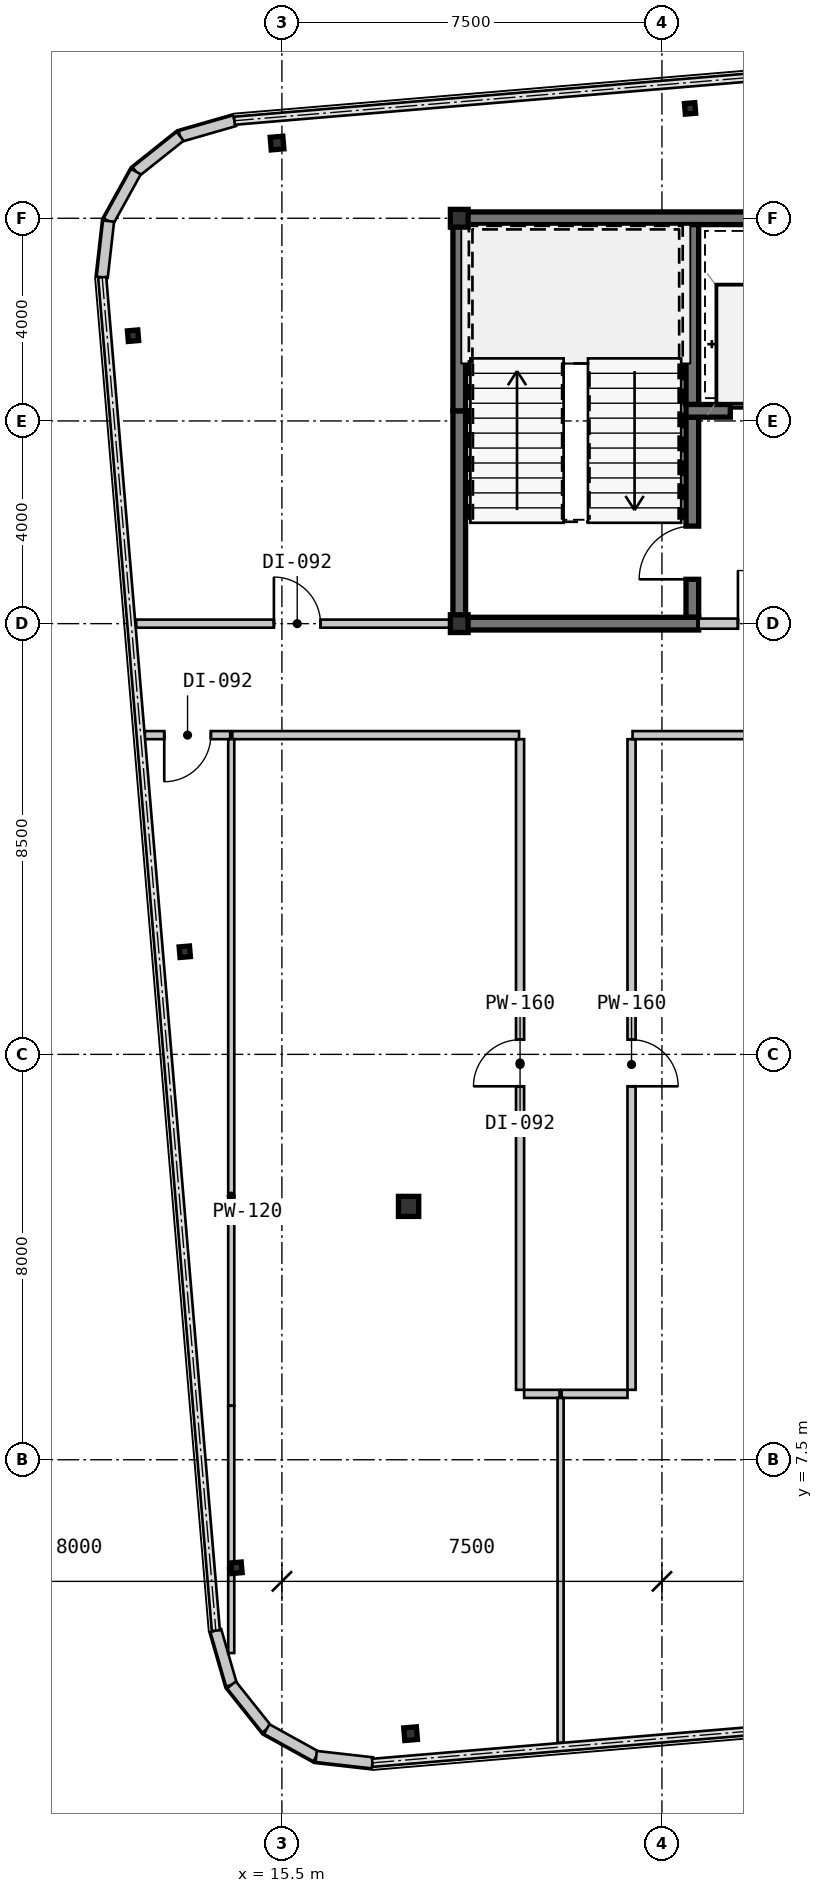
"""IFC4 building model, lengths in metres.
Left out: names, types, materials, properties, quantities, classifications, styles, units other than length and angle.
Written with IfcOpenShell. Run it as: python <this file> out.ifc"""

import sys

from ifc_helpers import new_model, si_unit, direction, frame, frame_2d, origin, origin_2d, place, context, subcontext, project, spatial, rectangle, hollow_rectangle, i_section, extrude, source, transform, mapped, element, fill, save


model = new_model("IFC4")
c1 = context("Model", 3, precision=1e-05, world=origin(), true_north=direction((0.0, 1.0)))
c2 = subcontext(c1, "Body", "Model", "MODEL_VIEW")
j1 = project(units=[si_unit("LENGTHUNIT", "METRE"), si_unit("PLANEANGLEUNIT", "RADIAN")], contexts=[c1])
p1 = place(None, origin())
s1 = spatial("IfcSite", under=j1, at=p1, CompositionType="ELEMENT")
p2 = place(p1, origin())
s2 = spatial("IfcBuilding", under=s1, at=p2, CompositionType="ELEMENT")
p3 = place(p2, frame((0.0, 0.0, 172.55)))
s3 = spatial("IfcBuildingStorey", under=s2, at=p3, CompositionType="ELEMENT", Elevation=172.55)
m1 = source(origin(), c2, "Body", "SweptSolid", [
    extrude(hollow_rectangle(XDim=0.35, YDim=0.35, WallThickness=0.016, at=origin_2d()), origin(), (0.0, 0.0, 1.0), 3.15),
])
for number, where, z_axis, x_axis in (
    (1, (19.0, 24.0, 0.0), (0.0, 0.0, 1.0), (1.0, 0.0, 0.0)),
    (2, (19.0, 32.0, 0.0), (0.0, 0.0, 1.0), (1.0, 0.0, 0.0)),
):
    element("IfcColumn", number, at=place(p3, frame(where, z_axis=z_axis, x_axis=x_axis)), inside=s3, PredefinedType="COLUMN", context=c2, shape_type="MappedRepresentation", body=[
        mapped(m1, transform((0.0, 0.0, 0.0), scale=1.0)),
    ])
m2 = source(origin(), c2, "Body", "SweptSolid", [
    extrude(i_section(OverallWidth=0.4, OverallDepth=0.396, WebThickness=0.022, FlangeThickness=0.034, at=origin_2d()), origin(), (0.0, 0.0, 1.0), 3.15),
])
p4 = place(p3, frame((18.0, 12.5, 0.0), z_axis=(0.0, 0.0, 1.0), x_axis=(1.0, 0.0, 0.0)))
e3 = element("IfcColumn", 3, at=p4, inside=s3, PredefinedType="COLUMN", context=c2, shape_type="MappedRepresentation", body=[
    mapped(m2, transform((0.0, 0.0, 0.0), scale=1.0)),
])
m3 = source(origin(), c2, "Body", "SweptSolid", [
    extrude(hollow_rectangle(XDim=0.25, YDim=0.25, WallThickness=0.01, at=origin_2d()), origin(), (0.0, 0.0, 1.0), 3.15),
])
for number, where, z_axis, x_axis in (
    (4, (18.04, 2.094, 0.0), (0.0, 0.0, 1.0), (0.996, 0.084, 0.0)),
    (5, (15.404, 33.484, 0.0), (0.0, 0.0, 1.0), (0.996, 0.084, 0.0)),
):
    element("IfcColumn", number, at=place(p3, frame(where, z_axis=z_axis, x_axis=x_axis)), inside=s3, PredefinedType="COLUMN", context=c2, shape_type="MappedRepresentation", body=[
        mapped(m3, transform((0.0, 0.0, 0.0), scale=1.0)),
    ])
m4 = source(origin(), c2, "Body", "SweptSolid", [
    extrude(i_section(OverallWidth=0.205, OverallDepth=0.21, WebThickness=0.009, FlangeThickness=0.014, at=origin_2d()), origin(), (0.0, 0.0, 1.0), 3.15),
])
for number, where, z_axis, x_axis in (
    (6, (23.555, 34.168, 0.0), (0.0, 0.0, 1.0), (0.996, 0.084, 0.0)),
    (7, (14.604, 5.368, 0.0), (0.0, 0.0, 1.0), (0.996, 0.084, 0.0)),
    (8, (13.583, 17.525, 0.0), (0.0, 0.0, 1.0), (0.996, 0.084, 0.0)),
    (9, (12.562, 29.682, 0.0), (0.0, 0.0, 1.0), (0.996, 0.084, 0.0)),
):
    element("IfcColumn", number, at=place(p3, frame(where, z_axis=z_axis, x_axis=x_axis)), inside=s3, PredefinedType="COLUMN", context=c2, shape_type="MappedRepresentation", body=[
        mapped(m4, transform((0.0, 0.0, 0.0), scale=1.0)),
    ])
m5 = source(origin(), c2, "Body", "SweptSolid", [
    extrude(rectangle(XDim=1.116, YDim=0.22, at=frame_2d((0.558, 0.0))), origin(), (0.0, 0.0, 1.0), 2.93),
])
p5 = place(p3, frame((14.564, 33.925, 0.0), z_axis=(0.0, 0.0, 1.0), x_axis=(-0.961010464297, -0.276512002475, 0.0)))
e10 = element("IfcWall", 10, at=p5, inside=s3, PredefinedType="SOLIDWALL", context=c2, shape_type="MappedRepresentation", body=[
    mapped(m5, transform((0.0, 0.0, 0.0), scale=1.0)),
])
m6 = source(origin(), c2, "Body", "SweptSolid", [
    extrude(rectangle(XDim=1.116, YDim=0.22, at=frame_2d((0.558, 0.0))), origin(), (0.0, 0.0, 1.0), 2.93),
])
p6 = place(p3, frame((13.491, 33.616, 0.0), z_axis=(0.0, 0.0, 1.0), x_axis=(-0.782062884215, -0.623199522732, 0.0)))
e11 = element("IfcWall", 11, at=p6, inside=s3, PredefinedType="SOLIDWALL", context=c2, shape_type="MappedRepresentation", body=[
    mapped(m6, transform((0.0, 0.0, 0.0), scale=1.0)),
])
for number, where, z_axis, x_axis in (
    (12, (12.619, 32.921, 0.0), (0.0, 0.0, 1.0), (-0.484, -0.875, 0.0)),
    (13, (12.079, 31.944, 0.0), (0.0, 0.0, 1.0), (-0.112, -0.994, 0.0)),
    (14, (14.196, 4.13, 0.0), (0.0, 0.0, 1.0), (0.277, -0.961, 0.0)),
    (15, (14.504, 3.057, 0.0), (0.0, 0.0, 1.0), (0.623, -0.782, 0.0)),
    (16, (15.2, 2.184, 0.0), (0.0, 0.0, 1.0), (0.875, -0.484, 0.0)),
    (17, (16.176, 1.644, 0.0), (0.0, 0.0, 1.0), (0.994, -0.112, 0.0)),
):
    element("IfcWall", number, at=place(p3, frame(where, z_axis=z_axis, x_axis=x_axis)), inside=s3, PredefinedType="SOLIDWALL", context=c2, shape_type="MappedRepresentation", body=[
        mapped(m5, transform((0.0, 0.0, 0.0), scale=1.0)),
    ])
m7 = source(origin(), c2, "Body", "SweptSolid", [
    extrude(rectangle(XDim=9.125, YDim=0.25, at=frame_2d((4.562, 0.0))), origin(), (0.0, 0.0, 1.0), 2.93),
])
p7 = place(p3, frame((18.875, 32.0, 0.0), z_axis=(0.0, 0.0, 1.0), x_axis=(1.0, 0.0, 0.0)))
e18 = element("IfcWall", 18, at=p7, inside=s3, PredefinedType="SHEAR", context=c2, shape_type="MappedRepresentation", body=[
    mapped(m7, transform((0.0, 0.0, 0.0), scale=1.0)),
])
m8 = source(origin(), c2, "Body", "SweptSolid", [
    extrude(rectangle(XDim=4.075, YDim=0.25, at=frame_2d((2.038, 0.0))), origin(), (0.0, 0.0, 1.0), 2.93),
])
p8 = place(p3, frame((19.0, 24.125, 0.0), z_axis=(0.0, 0.0, 1.0), x_axis=(0.0, 1.0, 0.0)))
e19 = element("IfcWall", 19, at=p8, inside=s3, PredefinedType="SHEAR", context=c2, shape_type="MappedRepresentation", body=[
    mapped(m8, transform((0.0, 0.0, 0.0), scale=1.0)),
])
m9 = source(origin(), c2, "Body", "SweptSolid", [
    extrude(rectangle(XDim=3.675, YDim=0.25, at=frame_2d((1.837, 0.0))), origin(), (0.0, 0.0, 1.0), 2.93),
])
p9 = place(p3, frame((19.0, 28.2, 0.0), z_axis=(0.0, 0.0, 1.0), x_axis=(0.0, 1.0, 0.0)))
e20 = element("IfcWall", 20, at=p9, inside=s3, PredefinedType="SHEAR", context=c2, shape_type="MappedRepresentation", body=[
    mapped(m9, transform((0.0, 0.0, 0.0), scale=1.0)),
])
m10 = source(origin(), c2, "Body", "SweptSolid", [
    extrude(rectangle(XDim=3.55, YDim=0.25, at=frame_2d((1.775, 0.0))), origin(), (0.0, 0.0, 1.0), 2.93),
])
p10 = place(p3, frame((23.6, 28.325, 0.0), z_axis=(0.0, 0.0, 1.0), x_axis=(0.0, 1.0, 0.0)))
e21 = element("IfcWall", 21, at=p10, inside=s3, PredefinedType="SHEAR", context=c2, shape_type="MappedRepresentation", body=[
    mapped(m10, transform((0.0, 0.0, 0.0), scale=1.0)),
])
m11 = source(origin(), c2, "Body", "SweptSolid", [
    extrude(rectangle(XDim=3.95, YDim=0.25, at=frame_2d((1.975, 0.0))), origin(), (0.0, 0.0, 1.0), 2.93),
])
p11 = place(p3, frame((23.6, 24.125, 0.0), z_axis=(0.0, 0.0, 1.0), x_axis=(0.0, 1.0, 0.0)))
e22 = element("IfcWall", 22, at=p11, inside=s3, PredefinedType="SHEAR", context=c2, shape_type="MappedRepresentation", body=[
    mapped(m11, transform((0.0, 0.0, 0.0), scale=1.0)),
])
m12 = source(origin(), c2, "Body", "SweptSolid", [
    extrude(rectangle(XDim=1.05, YDim=2.1, at=frame_2d((0.525, 1.05))), frame((0.0, 0.135, 0.0), z_axis=(0.0, -1.0, 0.0), x_axis=(1.0, 0.0, 0.0)), (0.0, 0.0, 1.0), 0.27),
])
p12 = place(p11, frame((0.75, 0.0, 0.0)))
e23 = element("IfcOpeningElement", 23, at=p12, cuts=e22, PredefinedType="OPENING", context=c2, shape_type="MappedRepresentation", body=[
    mapped(m12, transform((0.0, 0.0, 0.0), scale=1.0)),
])
m13 = source(origin(), c2, "Body", "SweptSolid", [
    extrude(rectangle(XDim=4.85, YDim=0.25, at=frame_2d((2.425, 0.0))), origin(), (0.0, 0.0, 1.0), 2.93),
])
p13 = place(p3, frame((18.875, 24.0, 0.0), z_axis=(0.0, 0.0, 1.0), x_axis=(1.0, 0.0, 0.0)))
e24 = element("IfcWall", 24, at=p13, inside=s3, PredefinedType="SHEAR", context=c2, shape_type="MappedRepresentation", body=[
    mapped(m13, transform((0.0, 0.0, 0.0), scale=1.0)),
])
m14 = source(origin(), c2, "Body", "SweptSolid", [
    extrude(rectangle(XDim=2.85, YDim=0.25, at=frame_2d((1.425, 0.0))), origin(), (0.0, 0.0, 1.0), 2.93),
])
p14 = place(p3, frame((23.475, 28.2, 0.0), z_axis=(0.0, 0.0, 1.0), x_axis=(1.0, 0.0, 0.0)))
e25 = element("IfcWall", 25, at=p14, inside=s3, PredefinedType="SHEAR", context=c2, shape_type="MappedRepresentation", body=[
    mapped(m14, transform((0.0, 0.0, 0.0), scale=1.0)),
])
m15 = source(origin(), c2, "Body", "SweptSolid", [
    extrude(rectangle(XDim=1.1, YDim=2.15, at=frame_2d((0.55, 1.075))), frame((0.0, 0.135, 0.0), z_axis=(0.0, -1.0, 0.0), x_axis=(1.0, 0.0, 0.0)), (0.0, 0.0, 1.0), 0.27),
])
p15 = place(p14, frame((0.875, 0.0, 0.0)))
e26 = element("IfcOpeningElement", 26, at=p15, cuts=e25, PredefinedType="OPENING", context=c2, shape_type="MappedRepresentation", body=[
    mapped(m15, transform((0.0, 0.0, 0.0), scale=1.0)),
])
m16 = source(origin(), c2, "Body", "SweptSolid", [
    extrude(rectangle(XDim=2.725, YDim=0.2, at=frame_2d((1.362, 0.0))), origin(), (0.0, 0.0, 1.0), 2.47),
])
p16 = place(p3, frame((23.725, 24.0, 0.0), z_axis=(0.0, 0.0, 1.0), x_axis=(1.0, 0.0, 0.0)))
e27 = element("IfcWall", 27, at=p16, inside=s3, PredefinedType="SOLIDWALL", context=c2, shape_type="MappedRepresentation", body=[
    mapped(m16, transform((0.0, 0.0, 0.0), scale=1.0)),
])
m17 = source(origin(), c2, "Body", "SweptSolid", [
    extrude(rectangle(XDim=1.05, YDim=2.1, at=frame_2d((0.525, 1.05))), frame((0.0, 0.11, 0.0), z_axis=(0.0, -1.0, 0.0), x_axis=(1.0, 0.0, 0.0)), (0.0, 0.0, 1.0), 0.22),
])
p17 = place(p16, frame((0.775, 0.0, 0.0)))
e28 = element("IfcOpeningElement", 28, at=p17, cuts=e27, PredefinedType="OPENING", context=c2, shape_type="MappedRepresentation", body=[
    mapped(m17, transform((0.0, 0.0, 0.0), scale=1.0)),
])
m18 = source(origin(), c2, "Body", "SweptSolid", [
    extrude(rectangle(XDim=6.251, YDim=0.16, at=frame_2d((3.125, 0.0))), origin(), (0.0, 0.0, 1.0), 2.93),
])
p18 = place(p3, frame((12.624, 24.0, 0.0), z_axis=(0.0, 0.0, 1.0), x_axis=(1.0, 0.0, 0.0)))
e29 = element("IfcWall", 29, at=p18, inside=s3, PredefinedType="PARTITIONING", context=c2, shape_type="MappedRepresentation", body=[
    mapped(m18, transform((0.0, 0.0, 0.0), scale=1.0)),
])
m19 = source(origin(), c2, "Body", "SweptSolid", [
    extrude(rectangle(XDim=0.92, YDim=2.1, at=frame_2d((0.46, 1.05))), frame((0.0, 0.09, 0.0), z_axis=(0.0, -1.0, 0.0), x_axis=(1.0, 0.0, 0.0)), (0.0, 0.0, 1.0), 0.18),
])
p19 = place(p18, frame((2.718, 0.0, 0.0)))
e30 = element("IfcOpeningElement", 30, at=p19, cuts=e29, PredefinedType="OPENING", context=c2, shape_type="MappedRepresentation", body=[
    mapped(m19, transform((0.0, 0.0, 0.0), scale=1.0)),
])
m20 = source(origin(), c2, "Body", "SweptSolid", [
    extrude(rectangle(XDim=1.684, YDim=0.16, at=frame_2d((0.842, 0.0))), origin(), (0.0, 0.0, 1.0), 2.93),
])
p20 = place(p3, frame((14.48, 21.8, 0.0), z_axis=(0.0, 0.0, 1.0), x_axis=(-1.0, 0.0, 0.0)))
e31 = element("IfcWall", 31, at=p20, inside=s3, PredefinedType="PARTITIONING", context=c2, shape_type="MappedRepresentation", body=[
    mapped(m20, transform((0.0, 0.0, 0.0), scale=1.0)),
])
p21 = place(p20, frame((0.382, 0.0, 0.0)))
e32 = element("IfcOpeningElement", 32, at=p21, cuts=e31, PredefinedType="OPENING", context=c2, shape_type="MappedRepresentation", body=[
    mapped(m19, transform((0.0, 0.0, 0.0), scale=1.0)),
])
m21 = source(origin(), c2, "Body", "SweptSolid", [
    extrude(rectangle(XDim=12.84, YDim=0.16, at=frame_2d((6.42, 0.0))), origin(), (0.0, 0.0, 1.0), 2.93),
])
p22 = place(p3, frame((20.2, 8.88, 0.0), z_axis=(0.0, 0.0, 1.0), x_axis=(0.0, 1.0, 0.0)))
e33 = element("IfcWall", 33, at=p22, inside=s3, PredefinedType="PARTITIONING", context=c2, shape_type="MappedRepresentation", body=[
    mapped(m21, transform((0.0, 0.0, 0.0), scale=1.0)),
])
p23 = place(p22, frame((5.99, 0.0, 0.0)))
e34 = element("IfcOpeningElement", 34, at=p23, cuts=e33, PredefinedType="OPENING", context=c2, shape_type="MappedRepresentation", body=[
    mapped(m19, transform((0.0, 0.0, 0.0), scale=1.0)),
])
m22 = source(origin(), c2, "Body", "SweptSolid", [
    extrude(rectangle(XDim=5.659, YDim=0.16, at=frame_2d((2.83, 0.0))), origin(), (0.0, 0.0, 1.0), 2.93),
])
p24 = place(p3, frame((20.18, 21.8, 0.0), z_axis=(0.0, 0.0, 1.0), x_axis=(-1.0, 0.0, 0.0)))
e35 = element("IfcWall", 35, at=p24, inside=s3, PredefinedType="PARTITIONING", context=c2, shape_type="MappedRepresentation", body=[
    mapped(m22, transform((0.0, 0.0, 0.0), scale=1.0)),
])
m23 = source(origin(), c2, "Body", "SweptSolid", [
    extrude(rectangle(XDim=0.7, YDim=0.16, at=frame_2d((0.35, 0.0))), origin(), (0.0, 0.0, 1.0), 2.93),
])
p25 = place(p3, frame((20.98, 8.8, 0.0), z_axis=(0.0, 0.0, 1.0), x_axis=(-1.0, 0.0, 0.0)))
e36 = element("IfcWall", 36, at=p25, inside=s3, PredefinedType="PARTITIONING", context=c2, shape_type="MappedRepresentation", body=[
    mapped(m23, transform((0.0, 0.0, 0.0), scale=1.0)),
])
p26 = place(p3, frame((22.4, 21.72, 0.0), z_axis=(0.0, 0.0, 1.0), x_axis=(0.0, -1.0, 0.0)))
e37 = element("IfcWall", 37, at=p26, inside=s3, PredefinedType="PARTITIONING", context=c2, shape_type="MappedRepresentation", body=[
    mapped(m21, transform((0.0, 0.0, 0.0), scale=1.0)),
])
p27 = place(p26, frame((5.93, 0.0, 0.0)))
e38 = element("IfcOpeningElement", 38, at=p27, cuts=e37, PredefinedType="OPENING", context=c2, shape_type="MappedRepresentation", body=[
    mapped(m19, transform((0.0, 0.0, 0.0), scale=1.0)),
])
m24 = source(origin(), c2, "Body", "SweptSolid", [
    extrude(rectangle(XDim=5.56, YDim=0.16, at=frame_2d((2.78, 0.0))), origin(), (0.0, 0.0, 1.0), 2.93),
])
p28 = place(p3, frame((27.98, 21.8, 0.0), z_axis=(0.0, 0.0, 1.0), x_axis=(-1.0, 0.0, 0.0)))
e39 = element("IfcWall", 39, at=p28, inside=s3, PredefinedType="PARTITIONING", context=c2, shape_type="MappedRepresentation", body=[
    mapped(m24, transform((0.0, 0.0, 0.0), scale=1.0)),
])
m25 = source(origin(), c2, "Body", "SweptSolid", [
    extrude(rectangle(XDim=1.3, YDim=0.16, at=frame_2d((0.65, 0.0))), origin(), (0.0, 0.0, 1.0), 2.93),
])
p29 = place(p3, frame((22.32, 8.8, 0.0), z_axis=(0.0, 0.0, 1.0), x_axis=(-1.0, 0.0, 0.0)))
e40 = element("IfcWall", 40, at=p29, inside=s3, PredefinedType="PARTITIONING", context=c2, shape_type="MappedRepresentation", body=[
    mapped(m25, transform((0.0, 0.0, 0.0), scale=1.0)),
])
m26 = source(origin(), c2, "Body", "SweptSolid", [
    extrude(rectangle(XDim=13.155, YDim=0.12, at=frame_2d((6.577, 0.0))), origin(), (0.0, 0.0, 1.0), 2.93),
])
p30 = place(p3, frame((14.5, 21.72, 0.0), z_axis=(0.0, 0.0, 1.0), x_axis=(0.0, -1.0, 0.0)))
e41 = element("IfcWall", 41, at=p30, inside=s3, PredefinedType="PARTITIONING", context=c2, shape_type="MappedRepresentation", body=[
    mapped(m26, transform((0.0, 0.0, 0.0), scale=1.0)),
])
m27 = source(origin(), c2, "Body", "SweptSolid", [
    extrude(rectangle(XDim=3.206, YDim=0.12, at=frame_2d((1.603, 0.0))), origin(), (0.0, 0.0, 1.0), 2.402),
])
p31 = place(p3, frame((14.5, 8.565, 0.0), z_axis=(0.0, 0.0, 1.0), x_axis=(0.0, -1.0, 0.0)))
e42 = element("IfcWall", 42, at=p31, inside=s3, PredefinedType="PARTITIONING", context=c2, shape_type="MappedRepresentation", body=[
    mapped(m27, transform((0.0, 0.0, 0.0), scale=1.0)),
])
m28 = source(origin(), c2, "Body", "SweptSolid", [
    extrude(rectangle(XDim=1.674, YDim=0.12, at=frame_2d((0.837, 0.0))), origin(), (0.0, 0.0, 1.0), 2.93),
])
p32 = place(p3, frame((14.5, 5.359, 0.0), z_axis=(0.0, 0.0, 1.0), x_axis=(0.0, -1.0, 0.0)))
e43 = element("IfcWall", 43, at=p32, inside=s3, PredefinedType="PARTITIONING", context=c2, shape_type="MappedRepresentation", body=[
    mapped(m28, transform((0.0, 0.0, 0.0), scale=1.0)),
])
m29 = source(origin(), c2, "Body", "SweptSolid", [
    extrude(rectangle(XDim=6.806, YDim=0.12, at=frame_2d((3.403, 0.0))), origin(), (0.0, 0.0, 1.0), 2.93),
])
p33 = place(p3, frame((21.0, 8.72, 0.0), z_axis=(0.0, 0.0, 1.0), x_axis=(0.0, -1.0, 0.0)))
e44 = element("IfcWall", 44, at=p33, inside=s3, PredefinedType="PARTITIONING", context=c2, shape_type="MappedRepresentation", body=[
    mapped(m29, transform((0.0, 0.0, 0.0), scale=1.0)),
])
m30 = source(origin(), c2, "Body", "SweptSolid", [
    extrude(rectangle(XDim=1.05, YDim=2.1, at=frame_2d((0.525, 1.05))), frame((0.0, 0.025, 0.0), z_axis=(0.0, -1.0, 0.0), x_axis=(1.0, 0.0, 0.0)), (0.0, 0.0, 1.0), 0.05),
])
p34 = place(p12, origin())
e45 = element("IfcDoor", 45, at=p34, inside=s3, OperationType="SINGLE_SWING_LEFT", PredefinedType="DOOR", context=c2, shape_type="MappedRepresentation", body=[
    mapped(m30, transform((0.0, 0.0, 0.0), scale=1.0)),
])
fill(e23, e45)
m31 = source(origin(), c2, "Body", "SweptSolid", [
    extrude(rectangle(XDim=1.1, YDim=2.15, at=frame_2d((0.55, 1.075))), frame((0.0, 0.025, 0.0), z_axis=(0.0, -1.0, 0.0), x_axis=(1.0, 0.0, 0.0)), (0.0, 0.0, 1.0), 0.05),
])
p35 = place(p15, origin())
e46 = element("IfcDoor", 46, at=p35, inside=s3, OperationType="SLIDING_TO_LEFT", PredefinedType="DOOR", context=c2, shape_type="MappedRepresentation", body=[
    mapped(m31, transform((0.0, 0.0, 0.0), scale=1.0)),
])
fill(e26, e46)
p36 = place(p17, origin())
e47 = element("IfcDoor", 47, at=p36, inside=s3, OperationType="SINGLE_SWING_LEFT", PredefinedType="DOOR", context=c2, shape_type="MappedRepresentation", body=[
    mapped(m30, transform((0.0, 0.0, 0.0), scale=1.0)),
])
fill(e28, e47)
m32 = source(origin(), c2, "Body", "SweptSolid", [
    extrude(rectangle(XDim=0.92, YDim=2.1, at=frame_2d((0.46, 1.05))), frame((0.0, 0.025, 0.0), z_axis=(0.0, -1.0, 0.0), x_axis=(1.0, 0.0, 0.0)), (0.0, 0.0, 1.0), 0.05),
])
p37 = place(p19, origin())
e48 = element("IfcDoor", 48, at=p37, inside=s3, OperationType="SINGLE_SWING_LEFT", PredefinedType="DOOR", context=c2, shape_type="MappedRepresentation", body=[
    mapped(m32, transform((0.0, 0.0, 0.0), scale=1.0)),
])
fill(e30, e48)
p38 = place(p21, origin())
e49 = element("IfcDoor", 49, at=p38, inside=s3, OperationType="SINGLE_SWING_RIGHT", PredefinedType="DOOR", context=c2, shape_type="MappedRepresentation", body=[
    mapped(m32, transform((0.0, 0.0, 0.0), scale=1.0)),
])
fill(e32, e49)
p39 = place(p23, origin())
e50 = element("IfcDoor", 50, at=p39, inside=s3, OperationType="SINGLE_SWING_LEFT", PredefinedType="DOOR", context=c2, shape_type="MappedRepresentation", body=[
    mapped(m32, transform((0.0, 0.0, 0.0), scale=1.0)),
])
fill(e34, e50)
p40 = place(p27, origin())
e51 = element("IfcDoor", 51, at=p40, inside=s3, OperationType="SINGLE_SWING_RIGHT", PredefinedType="DOOR", context=c2, shape_type="MappedRepresentation", body=[
    mapped(m32, transform((0.0, 0.0, 0.0), scale=1.0)),
])
fill(e38, e51)
save(model, sys.argv[1])
